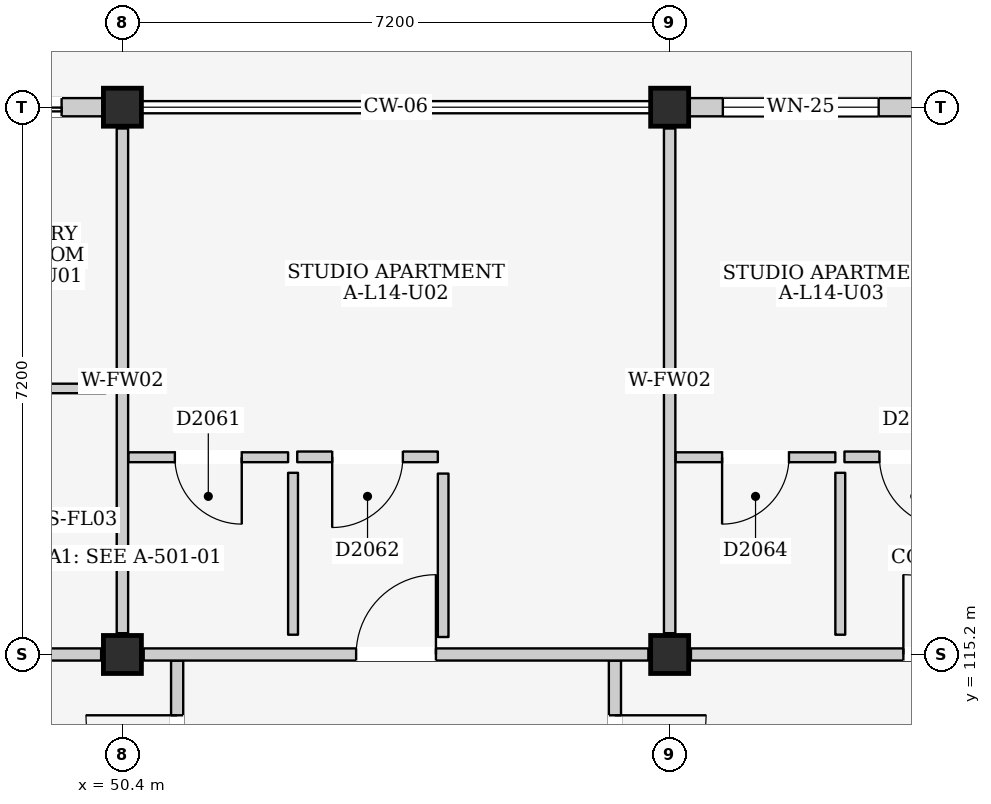
"""IFC4 building model, lengths in metres.
Left out: names, types, materials, properties, quantities, classifications, styles, units other than length and angle.
Written with IfcOpenShell. Run it as: python <this file> out.ifc"""

import sys

from ifc_helpers import new_model, si_unit, direction, frame, frame_2d, origin, origin_2d, place, context, subcontext, project, spatial, rectangle, extrude, element, fill, save


model = new_model("IFC4")
c1 = context("Model", 3, precision=1e-05, world=origin(), true_north=direction((0.0, 1.0)))
c2 = subcontext(c1, "Body", "Model", "MODEL_VIEW")
j1 = project(units=[si_unit("LENGTHUNIT", "METRE"), si_unit("PLANEANGLEUNIT", "RADIAN")], contexts=[c1])
p1 = place(None, origin())
s1 = spatial("IfcSite", under=j1, at=p1, CompositionType="ELEMENT")
p2 = place(p1, origin())
s2 = spatial("IfcBuilding", under=s1, at=p2, CompositionType="ELEMENT")
p3 = place(p2, frame((0.0, 0.0, 47.7)))
s3 = spatial("IfcBuildingStorey", under=s2, at=p3, CompositionType="ELEMENT", Elevation=47.7)
for number, where, z_axis, x_axis in (
    (1, (50.4, 115.2, 0.0), (0.0, 0.0, 1.0), (1.0, 0.0, 0.0)),
    (2, (50.4, 122.4, 0.0), (0.0, 0.0, 1.0), (1.0, 0.0, 0.0)),
    (3, (57.6, 115.2, 0.0), (0.0, 0.0, 1.0), (1.0, 0.0, 0.0)),
    (4, (57.6, 122.4, 0.0), (0.0, 0.0, 1.0), (1.0, 0.0, 0.0)),
):
    element("IfcColumn", number, at=place(p3, frame(where, z_axis=z_axis, x_axis=x_axis)), inside=s3, PredefinedType="COLUMN", context=c2, shape_type="SweptSolid", body=[
        extrude(rectangle(XDim=0.5, YDim=0.5, at=origin_2d()), origin(), (0.0, 0.0, 1.0), 3.2),
    ])
p4 = place(p3, frame((43.45, 122.4, 0.0), z_axis=(0.0, 0.0, 1.0), x_axis=(1.0, 0.0, 0.0)))
e5 = element("IfcWall", 5, at=p4, inside=s3, PredefinedType="ELEMENTEDWALL", context=c2, shape_type="SweptSolid", body=[
    extrude(rectangle(XDim=6.7, YDim=0.24, at=frame_2d((3.35, 0.0))), origin(), (0.0, 0.0, 1.0), 2.535),
])
p5 = place(p4, frame((4.15, 0.0, 0.0)))
e6 = element("IfcOpeningElement", 6, at=p5, cuts=e5, PredefinedType="OPENING", context=c2, shape_type="SweptSolid", body=[
    extrude(rectangle(XDim=2.0, YDim=2.12, at=frame_2d((1.0, 1.06))), frame((0.0, 0.135, 0.0), z_axis=(0.0, -1.0, 0.0), x_axis=(1.0, 0.0, 0.0)), (0.0, 0.0, 1.0), 0.27),
])
p6 = place(p4, frame((0.45, 0.0, 0.9)))
e7 = element("IfcOpeningElement", 7, at=p6, cuts=e5, PredefinedType="OPENING", context=c2, shape_type="SweptSolid", body=[
    extrude(rectangle(XDim=1.85, YDim=1.4, at=frame_2d((0.925, 0.7))), frame((0.0, 0.135, 0.0), z_axis=(0.0, -1.0, 0.0), x_axis=(1.0, 0.0, 0.0)), (0.0, 0.0, 1.0), 0.27),
])
p7 = place(p3, frame((57.85, 122.4, 0.0), z_axis=(0.0, 0.0, 1.0), x_axis=(1.0, 0.0, 0.0)))
e8 = element("IfcWall", 8, at=p7, inside=s3, PredefinedType="ELEMENTEDWALL", context=c2, shape_type="SweptSolid", body=[
    extrude(rectangle(XDim=6.7, YDim=0.24, at=frame_2d((3.35, 0.0))), origin(), (0.0, 0.0, 1.0), 2.535),
])
p8 = place(p7, frame((4.35, 0.0, 0.0)))
e9 = element("IfcOpeningElement", 9, at=p8, cuts=e8, PredefinedType="OPENING", context=c2, shape_type="SweptSolid", body=[
    extrude(rectangle(XDim=1.8, YDim=2.12, at=frame_2d((0.9, 1.06))), frame((0.0, 0.135, 0.0), z_axis=(0.0, -1.0, 0.0), x_axis=(1.0, 0.0, 0.0)), (0.0, 0.0, 1.0), 0.27),
])
p9 = place(p7, frame((0.45, 0.0, 0.825)))
e10 = element("IfcOpeningElement", 10, at=p9, cuts=e8, PredefinedType="OPENING", context=c2, shape_type="SweptSolid", body=[
    extrude(rectangle(XDim=2.05, YDim=1.6, at=frame_2d((1.025, 0.8))), frame((0.0, 0.135, 0.0), z_axis=(0.0, -1.0, 0.0), x_axis=(1.0, 0.0, 0.0)), (0.0, 0.0, 1.0), 0.27),
])
p10 = place(p3, frame((51.12, 111.1, 0.0), z_axis=(0.0, 0.0, 1.0), x_axis=(0.0, 1.0, 0.0)))
e11 = element("IfcWall", 11, at=p10, inside=s3, PredefinedType="PARTITIONING", context=c2, shape_type="SweptSolid", body=[
    extrude(rectangle(XDim=4.02, YDim=0.16, at=frame_2d((2.01, 0.0))), origin(), (0.0, 0.0, 1.0), 3.0),
])
p11 = place(p10, frame((2.1, 0.0, 0.0)))
e12 = element("IfcOpeningElement", 12, at=p11, cuts=e11, PredefinedType="OPENING", context=c2, shape_type="SweptSolid", body=[
    extrude(rectangle(XDim=1.2, YDim=2.2, at=frame_2d((0.6, 1.1))), frame((0.0, 0.095, 0.0), z_axis=(0.0, -1.0, 0.0), x_axis=(1.0, 0.0, 0.0)), (0.0, 0.0, 1.0), 0.19),
])
p12 = place(p3, frame((56.88, 111.1, 0.0), z_axis=(0.0, 0.0, 1.0), x_axis=(0.0, 1.0, 0.0)))
e13 = element("IfcWall", 13, at=p12, inside=s3, PredefinedType="PARTITIONING", context=c2, shape_type="SweptSolid", body=[
    extrude(rectangle(XDim=4.02, YDim=0.16, at=frame_2d((2.01, 0.0))), origin(), (0.0, 0.0, 1.0), 3.0),
])
p13 = place(p12, frame((2.1, 0.0, 0.0)))
e14 = element("IfcOpeningElement", 14, at=p13, cuts=e13, PredefinedType="OPENING", context=c2, shape_type="SweptSolid", body=[
    extrude(rectangle(XDim=1.2, YDim=2.2, at=frame_2d((0.6, 1.1))), frame((0.0, 0.095, 0.0), z_axis=(0.0, -1.0, 0.0), x_axis=(1.0, 0.0, 0.0)), (0.0, 0.0, 1.0), 0.19),
])
p14 = place(p3, frame((43.48, 115.2, 0.0), z_axis=(0.0, 0.0, 1.0), x_axis=(1.0, 0.0, 0.0)))
e15 = element("IfcWall", 15, at=p14, inside=s3, PredefinedType="PARTITIONING", context=c2, shape_type="SweptSolid", body=[
    extrude(rectangle(XDim=6.64, YDim=0.16, at=frame_2d((3.32, 0.0))), origin(), (0.0, 0.0, 1.0), 2.335),
])
p15 = place(p14, frame((0.18, 0.0, 0.0)))
e16 = element("IfcOpeningElement", 16, at=p15, cuts=e15, PredefinedType="OPENING", context=c2, shape_type="SweptSolid", body=[
    extrude(rectangle(XDim=1.05, YDim=2.15, at=frame_2d((0.525, 1.075))), frame((0.0, 0.095, 0.0), z_axis=(0.0, -1.0, 0.0), x_axis=(1.0, 0.0, 0.0)), (0.0, 0.0, 1.0), 0.19),
])
p16 = place(p3, frame((50.4, 115.48, 0.0), z_axis=(0.0, 0.0, 1.0), x_axis=(0.0, 1.0, 0.0)))
e17 = element("IfcWall", 17, at=p16, inside=s3, PredefinedType="PARTITIONING", context=c2, shape_type="SweptSolid", body=[
    extrude(rectangle(XDim=6.64, YDim=0.15, at=frame_2d((3.32, 0.0))), origin(), (0.0, 0.0, 1.0), 2.485),
])
p17 = place(p3, frame((47.12, 118.7, 0.0), z_axis=(0.0, 0.0, 1.0), x_axis=(1.0, 0.0, 0.0)))
e18 = element("IfcWall", 18, at=p17, inside=s3, PredefinedType="PARTITIONING", context=c2, shape_type="SweptSolid", body=[
    extrude(rectangle(XDim=3.06, YDim=0.125, at=frame_2d((1.53, 0.0))), origin(), (0.0, 0.0, 1.0), 3.0),
])
p18 = place(p3, frame((50.68, 115.2, 0.0), z_axis=(0.0, 0.0, 1.0), x_axis=(1.0, 0.0, 0.0)))
e19 = element("IfcWall", 19, at=p18, inside=s3, PredefinedType="PARTITIONING", context=c2, shape_type="SweptSolid", body=[
    extrude(rectangle(XDim=6.64, YDim=0.16, at=frame_2d((3.32, 0.0))), origin(), (0.0, 0.0, 1.0), 2.335),
])
p19 = place(p18, frame((2.795, 0.0, 0.0)))
e20 = element("IfcOpeningElement", 20, at=p19, cuts=e19, PredefinedType="OPENING", context=c2, shape_type="SweptSolid", body=[
    extrude(rectangle(XDim=1.05, YDim=2.15, at=frame_2d((0.525, 1.075))), frame((0.0, 0.095, 0.0), z_axis=(0.0, -1.0, 0.0), x_axis=(1.0, 0.0, 0.0)), (0.0, 0.0, 1.0), 0.19),
])
p20 = place(p3, frame((57.6, 115.48, 0.0), z_axis=(0.0, 0.0, 1.0), x_axis=(0.0, 1.0, 0.0)))
e21 = element("IfcWall", 21, at=p20, inside=s3, PredefinedType="PARTITIONING", context=c2, shape_type="SweptSolid", body=[
    extrude(rectangle(XDim=6.64, YDim=0.15, at=frame_2d((3.32, 0.0))), origin(), (0.0, 0.0, 1.0), 2.485),
])
p21 = place(p3, frame((50.48, 117.795, 0.0), z_axis=(0.0, 0.0, 1.0), x_axis=(1.0, 0.0, 0.0)))
e22 = element("IfcWall", 22, at=p21, inside=s3, PredefinedType="PARTITIONING", context=c2, shape_type="SweptSolid", body=[
    extrude(rectangle(XDim=2.1, YDim=0.13, at=frame_2d((1.05, 0.0))), origin(), (0.0, 0.0, 1.0), 3.0),
])
p22 = place(p21, frame((0.61, 0.0, 0.0)))
e23 = element("IfcOpeningElement", 23, at=p22, cuts=e22, PredefinedType="OPENING", context=c2, shape_type="SweptSolid", body=[
    extrude(rectangle(XDim=0.88, YDim=2.1, at=frame_2d((0.44, 1.05))), frame((0.0, 0.08, 0.0), z_axis=(0.0, -1.0, 0.0), x_axis=(1.0, 0.0, 0.0)), (0.0, 0.0, 1.0), 0.16),
])
p23 = place(p3, frame((52.645, 115.46, 0.0), z_axis=(0.0, 0.0, 1.0), x_axis=(0.0, 1.0, 0.0)))
e24 = element("IfcWall", 24, at=p23, inside=s3, PredefinedType="PARTITIONING", context=c2, shape_type="SweptSolid", body=[
    extrude(rectangle(XDim=2.13, YDim=0.13, at=frame_2d((1.065, 0.0))), origin(), (0.0, 0.0, 1.0), 3.0),
])
p24 = place(p3, frame((52.7, 117.8, 0.0), z_axis=(0.0, 0.0, 1.0), x_axis=(1.0, 0.0, 0.0)))
e25 = element("IfcWall", 25, at=p24, inside=s3, PredefinedType="PARTITIONING", context=c2, shape_type="SweptSolid", body=[
    extrude(rectangle(XDim=1.85, YDim=0.14, at=frame_2d((0.925, 0.0))), origin(), (0.0, 0.0, 1.0), 3.0),
])
p25 = place(p24, frame((0.46, 0.0, 0.0)))
e26 = element("IfcOpeningElement", 26, at=p25, cuts=e25, PredefinedType="OPENING", context=c2, shape_type="SweptSolid", body=[
    extrude(rectangle(XDim=0.93, YDim=2.14, at=frame_2d((0.465, 1.07))), frame((0.0, 0.085, 0.0), z_axis=(0.0, -1.0, 0.0), x_axis=(1.0, 0.0, 0.0)), (0.0, 0.0, 1.0), 0.17),
])
p26 = place(p3, frame((54.62, 115.43, 0.0), z_axis=(0.0, 0.0, 1.0), x_axis=(0.0, 1.0, 0.0)))
e27 = element("IfcWall", 27, at=p26, inside=s3, PredefinedType="PARTITIONING", context=c2, shape_type="SweptSolid", body=[
    extrude(rectangle(XDim=2.15, YDim=0.14, at=frame_2d((1.075, 0.0))), origin(), (0.0, 0.0, 1.0), 3.0),
])
p27 = place(p3, frame((57.88, 115.2, 0.0), z_axis=(0.0, 0.0, 1.0), x_axis=(1.0, 0.0, 0.0)))
e28 = element("IfcWall", 28, at=p27, inside=s3, PredefinedType="PARTITIONING", context=c2, shape_type="SweptSolid", body=[
    extrude(rectangle(XDim=6.64, YDim=0.16, at=frame_2d((3.32, 0.0))), origin(), (0.0, 0.0, 1.0), 2.335),
])
p28 = place(p27, frame((2.795, 0.0, 0.0)))
e29 = element("IfcOpeningElement", 29, at=p28, cuts=e28, PredefinedType="OPENING", context=c2, shape_type="SweptSolid", body=[
    extrude(rectangle(XDim=1.05, YDim=2.15, at=frame_2d((0.525, 1.075))), frame((0.0, 0.095, 0.0), z_axis=(0.0, -1.0, 0.0), x_axis=(1.0, 0.0, 0.0)), (0.0, 0.0, 1.0), 0.19),
])
p29 = place(p3, frame((57.68, 117.795, 0.0), z_axis=(0.0, 0.0, 1.0), x_axis=(1.0, 0.0, 0.0)))
e30 = element("IfcWall", 30, at=p29, inside=s3, PredefinedType="PARTITIONING", context=c2, shape_type="SweptSolid", body=[
    extrude(rectangle(XDim=2.1, YDim=0.13, at=frame_2d((1.05, 0.0))), origin(), (0.0, 0.0, 1.0), 3.0),
])
p30 = place(p29, frame((0.61, 0.0, 0.0)))
e31 = element("IfcOpeningElement", 31, at=p30, cuts=e30, PredefinedType="OPENING", context=c2, shape_type="SweptSolid", body=[
    extrude(rectangle(XDim=0.88, YDim=2.1, at=frame_2d((0.44, 1.05))), frame((0.0, 0.08, 0.0), z_axis=(0.0, -1.0, 0.0), x_axis=(1.0, 0.0, 0.0)), (0.0, 0.0, 1.0), 0.16),
])
p31 = place(p3, frame((59.845, 115.46, 0.0), z_axis=(0.0, 0.0, 1.0), x_axis=(0.0, 1.0, 0.0)))
e32 = element("IfcWall", 32, at=p31, inside=s3, PredefinedType="PARTITIONING", context=c2, shape_type="SweptSolid", body=[
    extrude(rectangle(XDim=2.13, YDim=0.13, at=frame_2d((1.065, 0.0))), origin(), (0.0, 0.0, 1.0), 3.0),
])
p32 = place(p3, frame((59.9, 117.8, 0.0), z_axis=(0.0, 0.0, 1.0), x_axis=(1.0, 0.0, 0.0)))
e33 = element("IfcWall", 33, at=p32, inside=s3, PredefinedType="PARTITIONING", context=c2, shape_type="SweptSolid", body=[
    extrude(rectangle(XDim=1.85, YDim=0.14, at=frame_2d((0.925, 0.0))), origin(), (0.0, 0.0, 1.0), 3.0),
])
p33 = place(p32, frame((0.46, 0.0, 0.0)))
e34 = element("IfcOpeningElement", 34, at=p33, cuts=e33, PredefinedType="OPENING", context=c2, shape_type="SweptSolid", body=[
    extrude(rectangle(XDim=0.93, YDim=2.14, at=frame_2d((0.465, 1.07))), frame((0.0, 0.085, 0.0), z_axis=(0.0, -1.0, 0.0), x_axis=(1.0, 0.0, 0.0)), (0.0, 0.0, 1.0), 0.17),
])
p34 = place(p5, frame((2.0, 0.0, 0.0), z_axis=(0.0, 0.0, 1.0), x_axis=(-1.0, 0.0, 0.0)))
e35 = element("IfcDoor", 35, at=p34, inside=s3, OperationType="DOUBLE_DOOR_SLIDING", PredefinedType="DOOR", context=c2, shape_type="SweptSolid", body=[
    extrude(rectangle(XDim=2.0, YDim=2.12, at=frame_2d((1.0, 1.06))), frame((0.0, 0.025, 0.0), z_axis=(0.0, -1.0, 0.0), x_axis=(1.0, 0.0, 0.0)), (0.0, 0.0, 1.0), 0.05),
])
fill(e6, e35)
p35 = place(p9, origin())
e36 = element("IfcWindow", 36, at=p35, inside=s3, PartitioningType="DOUBLE_PANEL_VERTICAL", PredefinedType="WINDOW", context=c2, shape_type="SweptSolid", body=[
    extrude(rectangle(XDim=2.05, YDim=1.6, at=frame_2d((1.025, 0.8))), frame((0.0, 0.03, 0.0), z_axis=(0.0, -1.0, 0.0), x_axis=(1.0, 0.0, 0.0)), (0.0, 0.0, 1.0), 0.06),
])
fill(e10, e36)
p36 = place(p11, origin())
e37 = element("IfcDoor", 37, at=p36, inside=s3, OperationType="SINGLE_SWING_RIGHT", PredefinedType="DOOR", context=c2, shape_type="SweptSolid", body=[
    extrude(rectangle(XDim=1.2, YDim=2.2, at=frame_2d((0.6, 1.1))), frame((0.0, 0.025, 0.0), z_axis=(0.0, -1.0, 0.0), x_axis=(1.0, 0.0, 0.0)), (0.0, 0.0, 1.0), 0.05),
])
fill(e12, e37)
p37 = place(p13, frame((1.2, 0.0, 0.0), z_axis=(0.0, 0.0, 1.0), x_axis=(-1.0, 0.0, 0.0)))
e38 = element("IfcDoor", 38, at=p37, inside=s3, OperationType="SINGLE_SWING_LEFT", PredefinedType="DOOR", context=c2, shape_type="SweptSolid", body=[
    extrude(rectangle(XDim=1.2, YDim=2.2, at=frame_2d((0.6, 1.1))), frame((0.0, 0.025, 0.0), z_axis=(0.0, -1.0, 0.0), x_axis=(1.0, 0.0, 0.0)), (0.0, 0.0, 1.0), 0.05),
])
fill(e14, e38)
p38 = place(p19, origin())
e39 = element("IfcDoor", 39, at=p38, inside=s3, OperationType="SINGLE_SWING_RIGHT", PredefinedType="DOOR", context=c2, shape_type="SweptSolid", body=[
    extrude(rectangle(XDim=1.05, YDim=2.15, at=frame_2d((0.525, 1.075))), frame((0.0, 0.025, 0.0), z_axis=(0.0, -1.0, 0.0), x_axis=(1.0, 0.0, 0.0)), (0.0, 0.0, 1.0), 0.05),
])
fill(e20, e39)
p39 = place(p22, frame((0.88, 0.0, 0.0), z_axis=(0.0, 0.0, 1.0), x_axis=(-1.0, 0.0, 0.0)))
e40 = element("IfcDoor", 40, at=p39, inside=s3, OperationType="SINGLE_SWING_LEFT", PredefinedType="DOOR", context=c2, shape_type="SweptSolid", body=[
    extrude(rectangle(XDim=0.88, YDim=2.1, at=frame_2d((0.44, 1.05))), frame((0.0, 0.025, 0.0), z_axis=(0.0, -1.0, 0.0), x_axis=(1.0, 0.0, 0.0)), (0.0, 0.0, 1.0), 0.05),
])
fill(e23, e40)
p40 = place(p25, frame((0.93, 0.0, 0.0), z_axis=(0.0, 0.0, 1.0), x_axis=(-1.0, 0.0, 0.0)))
e41 = element("IfcDoor", 41, at=p40, inside=s3, OperationType="SINGLE_SWING_RIGHT", PredefinedType="DOOR", context=c2, shape_type="SweptSolid", body=[
    extrude(rectangle(XDim=0.93, YDim=2.14, at=frame_2d((0.465, 1.07))), frame((0.0, 0.025, 0.0), z_axis=(0.0, -1.0, 0.0), x_axis=(1.0, 0.0, 0.0)), (0.0, 0.0, 1.0), 0.05),
])
fill(e26, e41)
p41 = place(p28, origin())
e42 = element("IfcDoor", 42, at=p41, inside=s3, OperationType="SINGLE_SWING_LEFT", PredefinedType="DOOR", context=c2, shape_type="SweptSolid", body=[
    extrude(rectangle(XDim=1.05, YDim=2.15, at=frame_2d((0.525, 1.075))), frame((0.0, 0.025, 0.0), z_axis=(0.0, -1.0, 0.0), x_axis=(1.0, 0.0, 0.0)), (0.0, 0.0, 1.0), 0.05),
])
fill(e29, e42)
p42 = place(p30, frame((0.88, 0.0, 0.0), z_axis=(0.0, 0.0, 1.0), x_axis=(-1.0, 0.0, 0.0)))
e43 = element("IfcDoor", 43, at=p42, inside=s3, OperationType="SINGLE_SWING_RIGHT", PredefinedType="DOOR", context=c2, shape_type="SweptSolid", body=[
    extrude(rectangle(XDim=0.88, YDim=2.1, at=frame_2d((0.44, 1.05))), frame((0.0, 0.025, 0.0), z_axis=(0.0, -1.0, 0.0), x_axis=(1.0, 0.0, 0.0)), (0.0, 0.0, 1.0), 0.05),
])
fill(e31, e43)
p43 = place(p33, frame((0.93, 0.0, 0.0), z_axis=(0.0, 0.0, 1.0), x_axis=(-1.0, 0.0, 0.0)))
e44 = element("IfcDoor", 44, at=p43, inside=s3, OperationType="SINGLE_SWING_LEFT", PredefinedType="DOOR", context=c2, shape_type="SweptSolid", body=[
    extrude(rectangle(XDim=0.93, YDim=2.14, at=frame_2d((0.465, 1.07))), frame((0.0, 0.025, 0.0), z_axis=(0.0, -1.0, 0.0), x_axis=(1.0, 0.0, 0.0)), (0.0, 0.0, 1.0), 0.05),
])
fill(e34, e44)
save(model, sys.argv[1])
